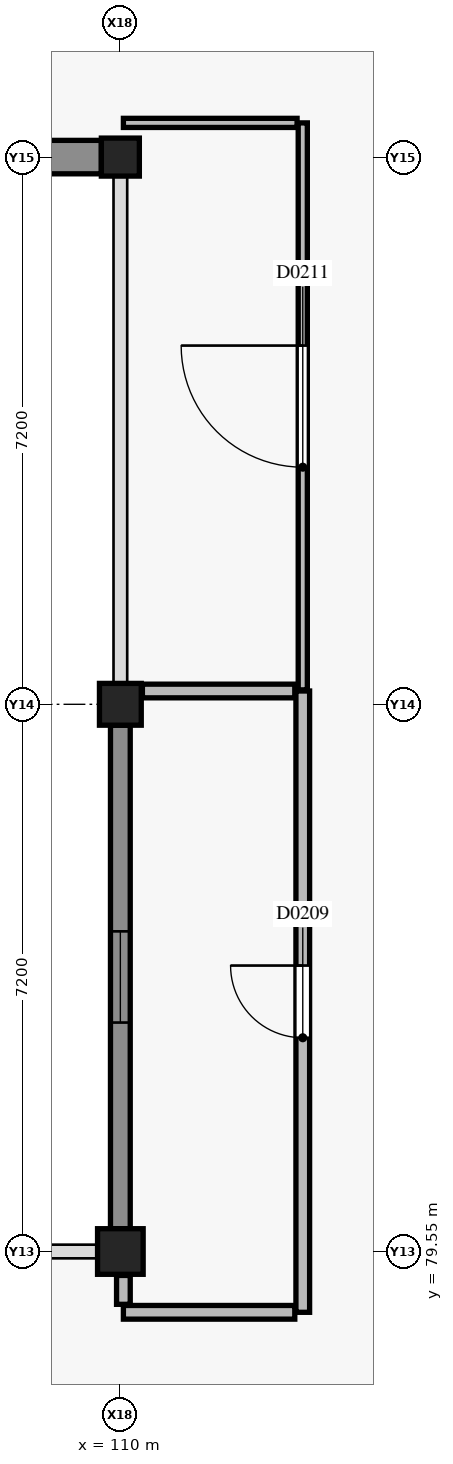
"""IFC4 building model, lengths in metres.
Left out: names, types, materials, properties, quantities, classifications, styles, units other than length and angle.
Written with IfcOpenShell. Run it as: python <this file> out.ifc"""

import sys

from ifc_helpers import new_model, si_unit, direction, frame, frame_2d, origin, origin_2d, place, context, subcontext, project, spatial, rectangle, extrude, element, fill, save


model = new_model("IFC4")
c1 = context("Model", 3, precision=1e-05, world=origin(), true_north=direction((0.0, 1.0)))
c2 = subcontext(c1, "Body", "Model", "MODEL_VIEW")
j1 = project(units=[si_unit("LENGTHUNIT", "METRE"), si_unit("PLANEANGLEUNIT", "RADIAN")], contexts=[c1])
p1 = place(None, origin())
s1 = spatial("IfcSite", under=j1, at=p1, CompositionType="ELEMENT")
p2 = place(p1, origin())
s2 = spatial("IfcBuilding", under=s1, at=p2, CompositionType="ELEMENT")
p3 = place(p2, frame((0.0, 0.0, 4.8)))
s3 = spatial("IfcBuildingStorey", under=s2, at=p3, CompositionType="ELEMENT", Elevation=4.8)
p4 = place(p3, frame((110.0, 79.55, 0.0), z_axis=(0.0, 0.0, 1.0), x_axis=(1.0, 0.0, 0.0)))
e1 = element("IfcColumn", 1, at=p4, inside=s3, PredefinedType="COLUMN", context=c2, shape_type="SweptSolid", body=[
    extrude(rectangle(XDim=0.6, YDim=0.6, at=origin_2d()), origin(), (0.0, 0.0, 1.0), 4.2),
])
p5 = place(p3, frame((110.0, 86.75, 0.0), z_axis=(0.0, 0.0, 1.0), x_axis=(1.0, 0.0, 0.0)))
e2 = element("IfcColumn", 2, at=p5, inside=s3, PredefinedType="COLUMN", context=c2, shape_type="SweptSolid", body=[
    extrude(rectangle(XDim=0.55, YDim=0.55, at=origin_2d()), origin(), (0.0, 0.0, 1.0), 4.2),
])
p6 = place(p3, frame((110.0, 93.95, 0.0), z_axis=(0.0, 0.0, 1.0), x_axis=(1.0, 0.0, 0.0)))
e3 = element("IfcColumn", 3, at=p6, inside=s3, PredefinedType="COLUMN", context=c2, shape_type="SweptSolid", body=[
    extrude(rectangle(XDim=0.5, YDim=0.5, at=origin_2d()), origin(), (0.0, 0.0, 1.0), 4.2),
])
p7 = place(p3, frame((110.0, 79.85, 0.0), z_axis=(0.0, 0.0, 1.0), x_axis=(0.0, 1.0, 0.0)))
e4 = element("IfcWall", 4, at=p7, inside=s3, PredefinedType="SOLIDWALL", context=c2, shape_type="SweptSolid", body=[
    extrude(rectangle(XDim=6.625, YDim=0.26, at=frame_2d((3.312, 0.0))), origin(), (0.0, 0.0, 1.0), 3.13),
])
p8 = place(p7, frame((2.712, 0.0, 0.6)))
e5 = element("IfcOpeningElement", 5, at=p8, cuts=e4, PredefinedType="OPENING", context=c2, shape_type="SweptSolid", body=[
    extrude(rectangle(XDim=1.2, YDim=2.2, at=frame_2d((0.6, 1.1))), frame((0.0, 0.14, 0.0), z_axis=(0.0, -1.0, 0.0), x_axis=(1.0, 0.0, 0.0)), (0.0, 0.0, 1.0), 0.28),
])
p9 = place(p3, frame((109.75, 93.95, 0.0), z_axis=(0.0, 0.0, 1.0), x_axis=(-1.0, 0.0, 0.0)))
e6 = element("IfcWall", 6, at=p9, inside=s3, PredefinedType="USERDEFINED", context=c2, shape_type="SweptSolid", body=[
    extrude(rectangle(XDim=6.725, YDim=0.44, at=frame_2d((3.363, 0.0))), origin(), (0.0, 0.0, 1.0), 3.13),
])
p10 = place(p9, frame((2.562, 0.0, 0.6)))
e7 = element("IfcOpeningElement", 7, at=p10, cuts=e6, PredefinedType="OPENING", context=c2, shape_type="SweptSolid", body=[
    extrude(rectangle(XDim=1.6, YDim=2.2, at=frame_2d((0.8, 1.1))), frame((0.0, 0.23, 0.0), z_axis=(0.0, -1.0, 0.0), x_axis=(1.0, 0.0, 0.0)), (0.0, 0.0, 1.0), 0.46),
])
p11 = place(p3, frame((112.4, 78.75, 0.0), z_axis=(0.0, 0.0, 1.0), x_axis=(0.0, 1.0, 0.0)))
e8 = element("IfcWall", 8, at=p11, inside=s3, PredefinedType="PLUMBINGWALL", context=c2, shape_type="SweptSolid", body=[
    extrude(rectangle(XDim=8.175, YDim=0.18, at=frame_2d((4.087, 0.0))), origin(), (0.0, 0.0, 1.0), 3.135),
])
p12 = place(p11, frame((3.613, 0.0, 0.0)))
e9 = element("IfcOpeningElement", 9, at=p12, cuts=e8, PredefinedType="OPENING", context=c2, shape_type="SweptSolid", body=[
    extrude(rectangle(XDim=0.95, YDim=2.1, at=frame_2d((0.475, 1.05))), frame((0.0, 0.1, 0.0), z_axis=(0.0, -1.0, 0.0), x_axis=(1.0, 0.0, 0.0)), (0.0, 0.0, 1.0), 0.2),
])
p13 = place(p3, frame((110.04, 78.75, 0.0), z_axis=(0.0, 0.0, 1.0), x_axis=(1.0, 0.0, 0.0)))
e10 = element("IfcWall", 10, at=p13, inside=s3, PredefinedType="PLUMBINGWALL", context=c2, shape_type="SweptSolid", body=[
    extrude(rectangle(XDim=2.255, YDim=0.18, at=frame_2d((1.127, 0.0))), origin(), (0.0, 0.0, 1.0), 3.285),
])
p14 = place(p3, frame((112.4, 86.94, 0.0), z_axis=(0.0, 0.0, 1.0), x_axis=(0.0, 1.0, 0.0)))
e11 = element("IfcWall", 11, at=p14, inside=s3, PredefinedType="PARTITIONING", context=c2, shape_type="SweptSolid", body=[
    extrude(rectangle(XDim=7.46, YDim=0.12, at=frame_2d((3.73, 0.0))), origin(), (0.0, 0.0, 1.0), 3.285),
])
p15 = place(p14, frame((2.93, 0.0, 0.0)))
e12 = element("IfcOpeningElement", 12, at=p15, cuts=e11, PredefinedType="OPENING", context=c2, shape_type="SweptSolid", body=[
    extrude(rectangle(XDim=1.6, YDim=2.25, at=frame_2d((0.8, 1.125))), frame((0.0, 0.07, 0.0), z_axis=(0.0, -1.0, 0.0), x_axis=(1.0, 0.0, 0.0)), (0.0, 0.0, 1.0), 0.14),
])
p16 = place(p3, frame((110.04, 94.4, 0.0), z_axis=(0.0, 0.0, 1.0), x_axis=(1.0, 0.0, 0.0)))
e13 = element("IfcWall", 13, at=p16, inside=s3, PredefinedType="PARTITIONING", context=c2, shape_type="SweptSolid", body=[
    extrude(rectangle(XDim=2.285, YDim=0.12, at=frame_2d((1.143, 0.0))), origin(), (0.0, 0.0, 1.0), 3.455),
])
p17 = place(p3, frame((110.29, 86.925, 0.0), z_axis=(0.0, 0.0, 1.0), x_axis=(1.0, 0.0, 0.0)))
e14 = element("IfcWall", 14, at=p17, inside=s3, PredefinedType="PLUMBINGWALL", context=c2, shape_type="SweptSolid", body=[
    extrude(rectangle(XDim=2.005, YDim=0.18, at=frame_2d((1.002, 0.0))), origin(), (0.0, 0.0, 1.0), 3.355),
])
p18 = place(p3, frame((110.04, 78.855, 0.0), z_axis=(0.0, 0.0, 1.0), x_axis=(0.0, 1.0, 0.0)))
e15 = element("IfcWall", 15, at=p18, inside=s3, PredefinedType="PLUMBINGWALL", context=c2, shape_type="SweptSolid", body=[
    extrude(rectangle(XDim=0.38, YDim=0.18, at=frame_2d((0.19, 0.0))), origin(), (0.0, 0.0, 1.0), 3.285),
])
p19 = place(p8, origin())
e16 = element("IfcWindow", 16, at=p19, inside=s3, PartitioningType="SINGLE_PANEL", PredefinedType="WINDOW", context=c2, shape_type="SweptSolid", body=[
    extrude(rectangle(XDim=1.2, YDim=2.2, at=frame_2d((0.6, 1.1))), frame((0.0, 0.03, 0.0), z_axis=(0.0, -1.0, 0.0), x_axis=(1.0, 0.0, 0.0)), (0.0, 0.0, 1.0), 0.06),
])
fill(e5, e16)
p20 = place(p12, origin())
e17 = element("IfcDoor", 17, at=p20, inside=s3, OperationType="SINGLE_SWING_RIGHT", PredefinedType="DOOR", context=c2, shape_type="SweptSolid", body=[
    extrude(rectangle(XDim=0.95, YDim=2.1, at=frame_2d((0.475, 1.05))), frame((0.0, 0.025, 0.0), z_axis=(0.0, -1.0, 0.0), x_axis=(1.0, 0.0, 0.0)), (0.0, 0.0, 1.0), 0.05),
])
fill(e9, e17)
p21 = place(p15, origin())
e18 = element("IfcDoor", 18, at=p21, inside=s3, OperationType="SINGLE_SWING_RIGHT", PredefinedType="DOOR", context=c2, shape_type="SweptSolid", body=[
    extrude(rectangle(XDim=1.6, YDim=2.25, at=frame_2d((0.8, 1.125))), frame((0.0, 0.025, 0.0), z_axis=(0.0, -1.0, 0.0), x_axis=(1.0, 0.0, 0.0)), (0.0, 0.0, 1.0), 0.05),
])
fill(e12, e18)
save(model, sys.argv[1])
